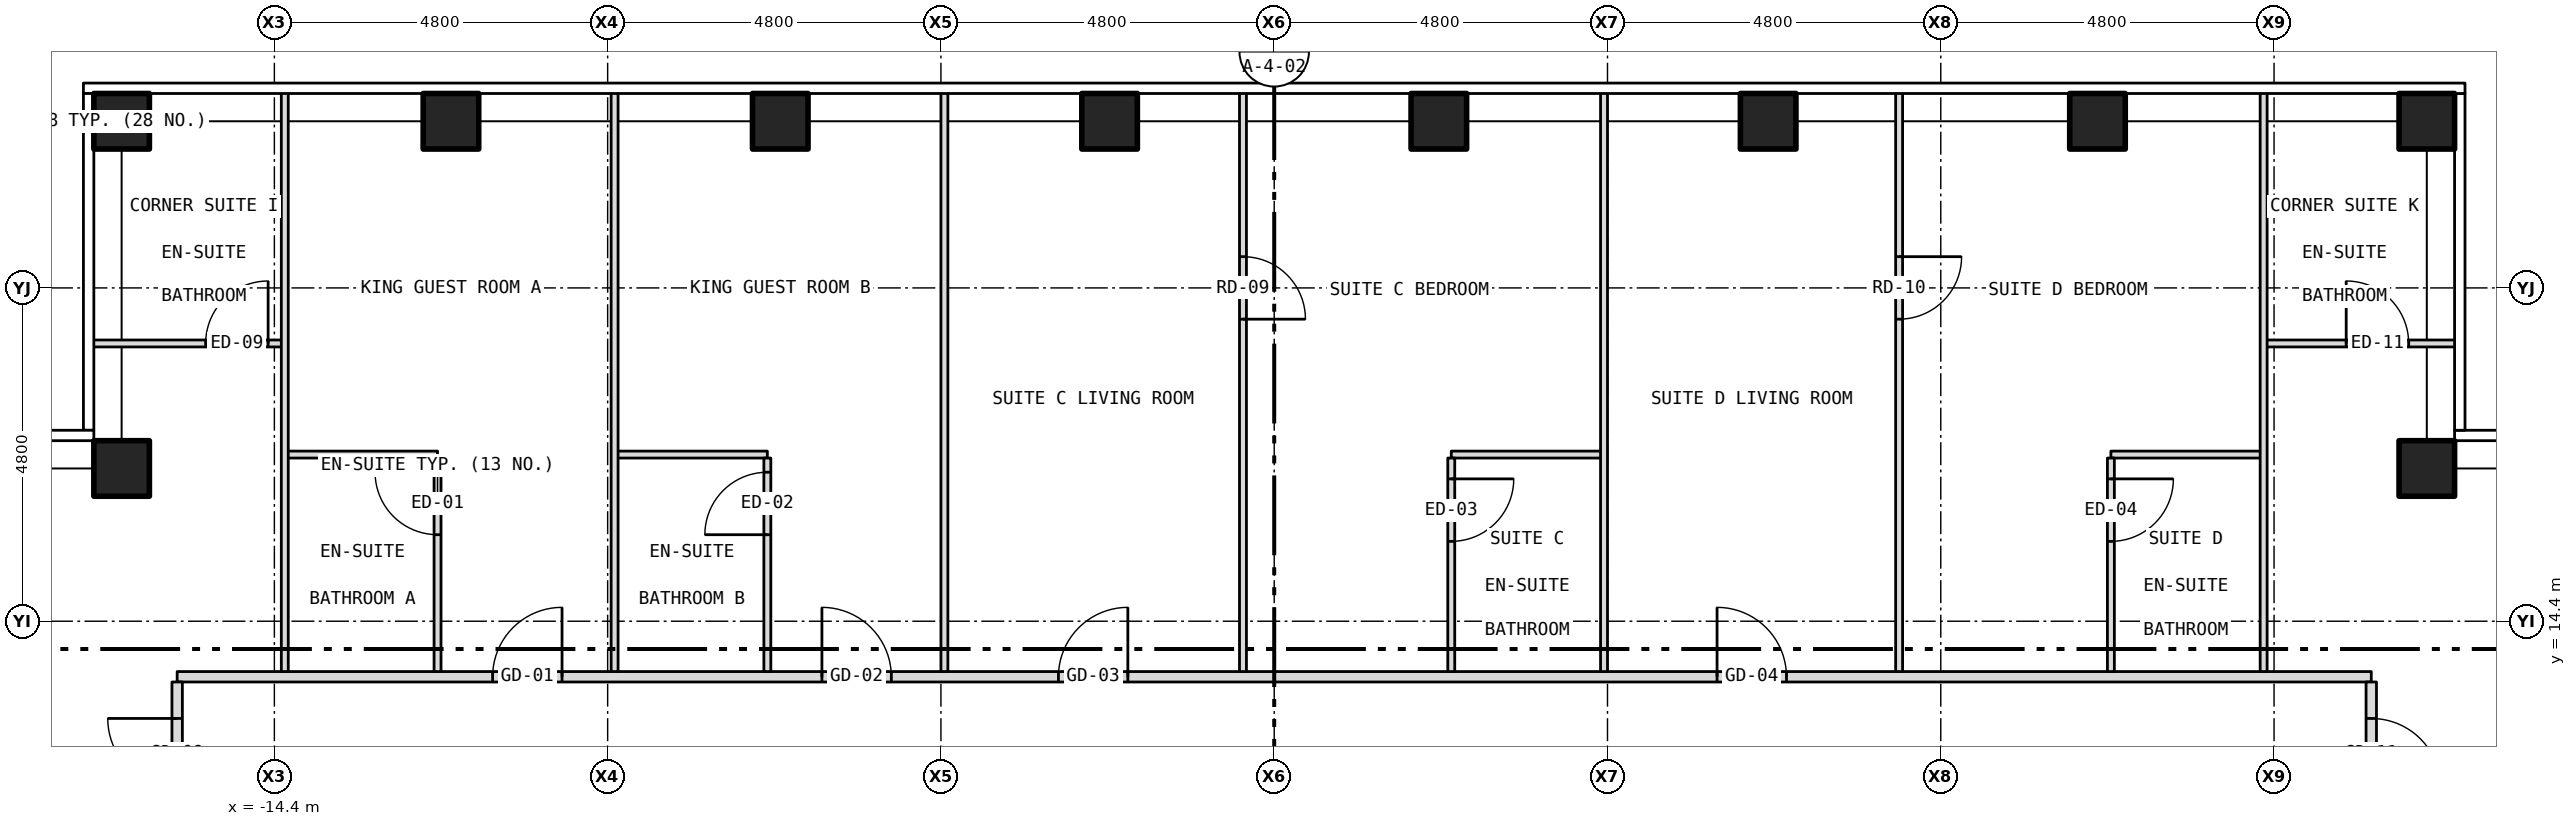
"""IFC4 building model, lengths in metres.
Left out: names, types, materials, properties, quantities, classifications, styles, units other than length and angle.
Written with IfcOpenShell. Run it as: python <this file> out.ifc"""

import sys

from ifc_helpers import new_model, si_unit, direction, frame, frame_2d, origin, origin_2d, place, context, subcontext, project, spatial, rectangle, hollow_rectangle, extrude, element, fill, save


model = new_model("IFC4")
c1 = context("Model", 3, precision=1e-05, world=origin(), true_north=direction((0.0, 1.0)))
c2 = subcontext(c1, "Body", "Model", "MODEL_VIEW")
j1 = project(units=[si_unit("LENGTHUNIT", "METRE"), si_unit("PLANEANGLEUNIT", "RADIAN")], contexts=[c1])
p1 = place(None, origin())
s1 = spatial("IfcSite", under=j1, at=p1, CompositionType="ELEMENT")
p2 = place(p1, origin())
s2 = spatial("IfcBuilding", under=s1, at=p2, CompositionType="ELEMENT")
p3 = place(p2, frame((0.0, 0.0, 165.5)))
s3 = spatial("IfcBuildingStorey", under=s2, at=p3, CompositionType="ELEMENT", Elevation=165.5)
for number, where, z_axis, x_axis in (
    (1, (-16.6, 21.6, -0.15), (0.0, 0.0, 1.0), (1.0, 0.0, 0.0)),
    (2, (-11.857, 21.6, -0.15), (0.0, 0.0, 1.0), (1.0, 0.0, 0.0)),
    (3, (-7.114, 21.6, -0.15), (0.0, 0.0, 1.0), (1.0, 0.0, 0.0)),
    (4, (-2.371, 21.6, -0.15), (0.0, 0.0, 1.0), (1.0, 0.0, 0.0)),
    (5, (2.371, 21.6, -0.15), (0.0, 0.0, 1.0), (1.0, 0.0, 0.0)),
    (6, (7.114, 21.6, -0.15), (0.0, 0.0, 1.0), (1.0, 0.0, 0.0)),
    (7, (11.857, 21.6, -0.15), (0.0, 0.0, 1.0), (1.0, 0.0, 0.0)),
    (8, (16.6, 21.6, -0.15), (0.0, 0.0, 1.0), (1.0, 0.0, 0.0)),
    (9, (-16.6, 16.6, -0.15), (0.0, 0.0, 1.0), (1.0, 0.0, 0.0)),
    (10, (16.6, 16.6, -0.15), (0.0, 0.0, 1.0), (1.0, 0.0, 0.0)),
):
    element("IfcColumn", number, at=place(p3, frame(where, z_axis=z_axis, x_axis=x_axis)), inside=s3, PredefinedType="COLUMN", context=c2, shape_type="SweptSolid", body=[
        extrude(hollow_rectangle(XDim=0.8, YDim=0.8, WallThickness=0.045, at=origin_2d()), origin(), (0.0, 0.0, 1.0), 3.5),
    ])
p4 = place(p3, frame((-15.8, 13.6, 0.0), z_axis=(0.0, 0.0, 1.0), x_axis=(1.0, 0.0, 0.0)))
e11 = element("IfcWall", 11, at=p4, inside=s3, PredefinedType="PARTITIONING", context=c2, shape_type="SweptSolid", body=[
    extrude(rectangle(XDim=31.6, YDim=0.15, at=frame_2d((15.8, 0.0))), origin(), (0.0, 0.0, 1.0), 3.35),
])
p5 = place(p4, frame((4.543, 0.0, 0.0)))
e12 = element("IfcOpeningElement", 12, at=p5, cuts=e11, PredefinedType="OPENING", context=c2, shape_type="SweptSolid", body=[
    extrude(rectangle(XDim=1.0, YDim=2.1, at=frame_2d((0.5, 1.05))), frame((0.0, 0.087, 0.0), z_axis=(0.0, -1.0, 0.0), x_axis=(1.0, 0.0, 0.0)), (0.0, 0.0, 1.0), 0.174),
])
p6 = place(p4, frame((9.286, 0.0, 0.0)))
e13 = element("IfcOpeningElement", 13, at=p6, cuts=e11, PredefinedType="OPENING", context=c2, shape_type="SweptSolid", body=[
    extrude(rectangle(XDim=1.0, YDim=2.1, at=frame_2d((0.5, 1.05))), frame((0.0, 0.087, 0.0), z_axis=(0.0, -1.0, 0.0), x_axis=(1.0, 0.0, 0.0)), (0.0, 0.0, 1.0), 0.174),
])
p7 = place(p4, frame((12.692, 0.0, 0.0)))
e14 = element("IfcOpeningElement", 14, at=p7, cuts=e11, PredefinedType="OPENING", context=c2, shape_type="SweptSolid", body=[
    extrude(rectangle(XDim=1.0, YDim=2.1, at=frame_2d((0.5, 1.05))), frame((0.0, 0.087, 0.0), z_axis=(0.0, -1.0, 0.0), x_axis=(1.0, 0.0, 0.0)), (0.0, 0.0, 1.0), 0.174),
])
p8 = place(p4, frame((22.178, 0.0, 0.0)))
e15 = element("IfcOpeningElement", 15, at=p8, cuts=e11, PredefinedType="OPENING", context=c2, shape_type="SweptSolid", body=[
    extrude(rectangle(XDim=1.0, YDim=2.1, at=frame_2d((0.5, 1.05))), frame((0.0, 0.087, 0.0), z_axis=(0.0, -1.0, 0.0), x_axis=(1.0, 0.0, 0.0)), (0.0, 0.0, 1.0), 0.174),
])
for number, where, z_axis, x_axis in (
    (16, (-14.25, 16.8, 0.0), (0.0, 0.0, 1.0), (1.0, 0.0, 0.0)),
    (17, (-9.5, 16.8, 0.0), (0.0, 0.0, 1.0), (1.0, 0.0, 0.0)),
    (18, (2.55, 16.8, 0.0), (0.0, 0.0, 1.0), (1.0, 0.0, 0.0)),
    (19, (12.05, 16.8, 0.0), (0.0, 0.0, 1.0), (1.0, 0.0, 0.0)),
):
    element("IfcWall", number, at=place(p3, frame(where, z_axis=z_axis, x_axis=x_axis)), inside=s3, PredefinedType="PARTITIONING", context=c2, shape_type="SweptSolid", body=[
        extrude(rectangle(XDim=2.2, YDim=0.1, at=frame_2d((1.1, 0.0))), origin(), (0.0, 0.0, 1.0), 3.35),
    ])
p9 = place(p3, frame((-17.03, 18.4, 0.0), z_axis=(0.0, 0.0, 1.0), x_axis=(1.0, 0.0, 0.0)))
e20 = element("IfcWall", 20, at=p9, inside=s3, PredefinedType="PARTITIONING", context=c2, shape_type="SweptSolid", body=[
    extrude(rectangle(XDim=2.78, YDim=0.1, at=frame_2d((1.39, 0.0))), origin(), (0.0, 0.0, 1.0), 3.35),
])
p10 = place(p9, frame((1.64, 0.0, 0.0)))
e21 = element("IfcOpeningElement", 21, at=p10, cuts=e20, PredefinedType="OPENING", context=c2, shape_type="SweptSolid", body=[
    extrude(rectangle(XDim=0.9, YDim=2.1, at=frame_2d((0.45, 1.05))), frame((0.0, 0.062, 0.0), z_axis=(0.0, -1.0, 0.0), x_axis=(1.0, 0.0, 0.0)), (0.0, 0.0, 1.0), 0.124),
])
p11 = place(p3, frame((14.25, 18.4, 0.0), z_axis=(0.0, 0.0, 1.0), x_axis=(1.0, 0.0, 0.0)))
e22 = element("IfcWall", 22, at=p11, inside=s3, PredefinedType="PARTITIONING", context=c2, shape_type="SweptSolid", body=[
    extrude(rectangle(XDim=2.78, YDim=0.1, at=frame_2d((1.39, 0.0))), origin(), (0.0, 0.0, 1.0), 3.35),
])
p12 = place(p11, frame((1.189, 0.0, 0.0)))
e23 = element("IfcOpeningElement", 23, at=p12, cuts=e22, PredefinedType="OPENING", context=c2, shape_type="SweptSolid", body=[
    extrude(rectangle(XDim=0.9, YDim=2.1, at=frame_2d((0.45, 1.05))), frame((0.0, 0.062, 0.0), z_axis=(0.0, -1.0, 0.0), x_axis=(1.0, 0.0, 0.0)), (0.0, 0.0, 1.0), 0.124),
])
p13 = place(p3, frame((-15.8, 10.92, 0.0), z_axis=(0.0, 0.0, 1.0), x_axis=(0.0, 1.0, 0.0)))
e24 = element("IfcWall", 24, at=p13, inside=s3, PredefinedType="PARTITIONING", context=c2, shape_type="SweptSolid", body=[
    extrude(rectangle(XDim=2.605, YDim=0.15, at=frame_2d((1.302, 0.0))), origin(), (0.0, 0.0, 1.0), 3.35),
])
p14 = place(p13, frame((1.08, 0.0, 0.0)))
e25 = element("IfcOpeningElement", 25, at=p14, cuts=e24, PredefinedType="OPENING", context=c2, shape_type="SweptSolid", body=[
    extrude(rectangle(XDim=1.0, YDim=2.1, at=frame_2d((0.5, 1.05))), frame((0.0, 0.087, 0.0), z_axis=(0.0, -1.0, 0.0), x_axis=(1.0, 0.0, 0.0)), (0.0, 0.0, 1.0), 0.174),
])
p15 = place(p3, frame((-14.25, 13.675, 0.0), z_axis=(0.0, 0.0, 1.0), x_axis=(0.0, 1.0, 0.0)))
e26 = element("IfcWall", 26, at=p15, inside=s3, PredefinedType="PARTITIONING", context=c2, shape_type="SweptSolid", body=[
    extrude(rectangle(XDim=8.355, YDim=0.1, at=frame_2d((4.177, 0.0))), origin(), (0.0, 0.0, 1.0), 2.817),
])
p16 = place(p3, frame((-12.05, 13.675, 0.0), z_axis=(0.0, 0.0, 1.0), x_axis=(0.0, 1.0, 0.0)))
e27 = element("IfcWall", 27, at=p16, inside=s3, PredefinedType="PARTITIONING", context=c2, shape_type="SweptSolid", body=[
    extrude(rectangle(XDim=3.075, YDim=0.1, at=frame_2d((1.538, 0.0))), origin(), (0.0, 0.0, 1.0), 3.35),
])
p17 = place(p16, frame((1.971, 0.0, 0.0)))
e28 = element("IfcOpeningElement", 28, at=p17, cuts=e27, PredefinedType="OPENING", context=c2, shape_type="SweptSolid", body=[
    extrude(rectangle(XDim=0.9, YDim=2.1, at=frame_2d((0.45, 1.05))), frame((0.0, 0.062, 0.0), z_axis=(0.0, -1.0, 0.0), x_axis=(1.0, 0.0, 0.0)), (0.0, 0.0, 1.0), 0.124),
])
p18 = place(p3, frame((-9.5, 13.675, 0.0), z_axis=(0.0, 0.0, 1.0), x_axis=(0.0, 1.0, 0.0)))
e29 = element("IfcWall", 29, at=p18, inside=s3, PredefinedType="PARTITIONING", context=c2, shape_type="SweptSolid", body=[
    extrude(rectangle(XDim=8.355, YDim=0.1, at=frame_2d((4.177, 0.0))), origin(), (0.0, 0.0, 1.0), 2.728),
])
p19 = place(p3, frame((-7.3, 13.675, 0.0), z_axis=(0.0, 0.0, 1.0), x_axis=(0.0, 1.0, 0.0)))
e30 = element("IfcWall", 30, at=p19, inside=s3, PredefinedType="PARTITIONING", context=c2, shape_type="SweptSolid", body=[
    extrude(rectangle(XDim=3.075, YDim=0.1, at=frame_2d((1.538, 0.0))), origin(), (0.0, 0.0, 1.0), 3.35),
])
p20 = place(p19, frame((1.971, 0.0, 0.0)))
e31 = element("IfcOpeningElement", 31, at=p20, cuts=e30, PredefinedType="OPENING", context=c2, shape_type="SweptSolid", body=[
    extrude(rectangle(XDim=0.9, YDim=2.1, at=frame_2d((0.45, 1.05))), frame((0.0, 0.062, 0.0), z_axis=(0.0, -1.0, 0.0), x_axis=(1.0, 0.0, 0.0)), (0.0, 0.0, 1.0), 0.124),
])
p21 = place(p3, frame((-4.75, 13.675, 0.0), z_axis=(0.0, 0.0, 1.0), x_axis=(0.0, 1.0, 0.0)))
e32 = element("IfcWall", 32, at=p21, inside=s3, PredefinedType="PARTITIONING", context=c2, shape_type="SweptSolid", body=[
    extrude(rectangle(XDim=8.355, YDim=0.1, at=frame_2d((4.177, 0.0))), origin(), (0.0, 0.0, 1.0), 2.817),
])
p22 = place(p3, frame((-0.45, 13.675, 0.0), z_axis=(0.0, 0.0, 1.0), x_axis=(0.0, 1.0, 0.0)))
e33 = element("IfcWall", 33, at=p22, inside=s3, PredefinedType="PARTITIONING", context=c2, shape_type="SweptSolid", body=[
    extrude(rectangle(XDim=8.355, YDim=0.1, at=frame_2d((4.177, 0.0))), origin(), (0.0, 0.0, 1.0), 3.35),
])
p23 = place(p22, frame((5.075, 0.0, 0.0)))
e34 = element("IfcOpeningElement", 34, at=p23, cuts=e33, PredefinedType="OPENING", context=c2, shape_type="SweptSolid", body=[
    extrude(rectangle(XDim=0.9, YDim=2.1, at=frame_2d((0.45, 1.05))), frame((0.0, 0.062, 0.0), z_axis=(0.0, -1.0, 0.0), x_axis=(1.0, 0.0, 0.0)), (0.0, 0.0, 1.0), 0.124),
])
p24 = place(p3, frame((2.55, 13.675, 0.0), z_axis=(0.0, 0.0, 1.0), x_axis=(0.0, 1.0, 0.0)))
e35 = element("IfcWall", 35, at=p24, inside=s3, PredefinedType="PARTITIONING", context=c2, shape_type="SweptSolid", body=[
    extrude(rectangle(XDim=3.075, YDim=0.1, at=frame_2d((1.538, 0.0))), origin(), (0.0, 0.0, 1.0), 3.35),
])
p25 = place(p24, frame((1.875, 0.0, 0.0)))
e36 = element("IfcOpeningElement", 36, at=p25, cuts=e35, PredefinedType="OPENING", context=c2, shape_type="SweptSolid", body=[
    extrude(rectangle(XDim=0.9, YDim=2.1, at=frame_2d((0.45, 1.05))), frame((0.0, 0.062, 0.0), z_axis=(0.0, -1.0, 0.0), x_axis=(1.0, 0.0, 0.0)), (0.0, 0.0, 1.0), 0.124),
])
p26 = place(p3, frame((4.75, 13.675, 0.0), z_axis=(0.0, 0.0, 1.0), x_axis=(0.0, 1.0, 0.0)))
e37 = element("IfcWall", 37, at=p26, inside=s3, PredefinedType="PARTITIONING", context=c2, shape_type="SweptSolid", body=[
    extrude(rectangle(XDim=8.355, YDim=0.1, at=frame_2d((4.177, 0.0))), origin(), (0.0, 0.0, 1.0), 2.817),
])
p27 = place(p3, frame((9.0, 13.675, 0.0), z_axis=(0.0, 0.0, 1.0), x_axis=(0.0, 1.0, 0.0)))
e38 = element("IfcWall", 38, at=p27, inside=s3, PredefinedType="PARTITIONING", context=c2, shape_type="SweptSolid", body=[
    extrude(rectangle(XDim=8.355, YDim=0.1, at=frame_2d((4.177, 0.0))), origin(), (0.0, 0.0, 1.0), 3.35),
])
p28 = place(p27, frame((5.075, 0.0, 0.0)))
e39 = element("IfcOpeningElement", 39, at=p28, cuts=e38, PredefinedType="OPENING", context=c2, shape_type="SweptSolid", body=[
    extrude(rectangle(XDim=0.9, YDim=2.1, at=frame_2d((0.45, 1.05))), frame((0.0, 0.062, 0.0), z_axis=(0.0, -1.0, 0.0), x_axis=(1.0, 0.0, 0.0)), (0.0, 0.0, 1.0), 0.124),
])
p29 = place(p3, frame((12.05, 13.675, 0.0), z_axis=(0.0, 0.0, 1.0), x_axis=(0.0, 1.0, 0.0)))
e40 = element("IfcWall", 40, at=p29, inside=s3, PredefinedType="PARTITIONING", context=c2, shape_type="SweptSolid", body=[
    extrude(rectangle(XDim=3.075, YDim=0.1, at=frame_2d((1.538, 0.0))), origin(), (0.0, 0.0, 1.0), 3.35),
])
p30 = place(p29, frame((1.875, 0.0, 0.0)))
e41 = element("IfcOpeningElement", 41, at=p30, cuts=e40, PredefinedType="OPENING", context=c2, shape_type="SweptSolid", body=[
    extrude(rectangle(XDim=0.9, YDim=2.1, at=frame_2d((0.45, 1.05))), frame((0.0, 0.062, 0.0), z_axis=(0.0, -1.0, 0.0), x_axis=(1.0, 0.0, 0.0)), (0.0, 0.0, 1.0), 0.124),
])
p31 = place(p3, frame((14.25, 13.675, 0.0), z_axis=(0.0, 0.0, 1.0), x_axis=(0.0, 1.0, 0.0)))
e42 = element("IfcWall", 42, at=p31, inside=s3, PredefinedType="PARTITIONING", context=c2, shape_type="SweptSolid", body=[
    extrude(rectangle(XDim=8.355, YDim=0.1, at=frame_2d((4.177, 0.0))), origin(), (0.0, 0.0, 1.0), 2.817),
])
p32 = place(p3, frame((15.8, 10.92, 0.0), z_axis=(0.0, 0.0, 1.0), x_axis=(0.0, 1.0, 0.0)))
e43 = element("IfcWall", 43, at=p32, inside=s3, PredefinedType="PARTITIONING", context=c2, shape_type="SweptSolid", body=[
    extrude(rectangle(XDim=2.605, YDim=0.15, at=frame_2d((1.302, 0.0))), origin(), (0.0, 0.0, 1.0), 3.35),
])
p33 = place(p32, frame((1.08, 0.0, 0.0)))
e44 = element("IfcOpeningElement", 44, at=p33, cuts=e43, PredefinedType="OPENING", context=c2, shape_type="SweptSolid", body=[
    extrude(rectangle(XDim=1.0, YDim=2.1, at=frame_2d((0.5, 1.05))), frame((0.0, 0.087, 0.0), z_axis=(0.0, -1.0, 0.0), x_axis=(1.0, 0.0, 0.0)), (0.0, 0.0, 1.0), 0.174),
])
p34 = place(p5, origin())
e45 = element("IfcDoor", 45, at=p34, inside=s3, OperationType="SINGLE_SWING_RIGHT", PredefinedType="DOOR", context=c2, shape_type="SweptSolid", body=[
    extrude(rectangle(XDim=1.0, YDim=2.1, at=frame_2d((0.5, 1.05))), frame((0.0, 0.025, 0.0), z_axis=(0.0, -1.0, 0.0), x_axis=(1.0, 0.0, 0.0)), (0.0, 0.0, 1.0), 0.05),
])
fill(e12, e45)
p35 = place(p17, origin())
e46 = element("IfcDoor", 46, at=p35, inside=s3, OperationType="SINGLE_SWING_RIGHT", PredefinedType="DOOR", context=c2, shape_type="SweptSolid", body=[
    extrude(rectangle(XDim=0.9, YDim=2.1, at=frame_2d((0.45, 1.05))), frame((0.0, 0.025, 0.0), z_axis=(0.0, -1.0, 0.0), x_axis=(1.0, 0.0, 0.0)), (0.0, 0.0, 1.0), 0.05),
])
fill(e28, e46)
p36 = place(p6, origin())
e47 = element("IfcDoor", 47, at=p36, inside=s3, OperationType="SINGLE_SWING_LEFT", PredefinedType="DOOR", context=c2, shape_type="SweptSolid", body=[
    extrude(rectangle(XDim=1.0, YDim=2.1, at=frame_2d((0.5, 1.05))), frame((0.0, 0.025, 0.0), z_axis=(0.0, -1.0, 0.0), x_axis=(1.0, 0.0, 0.0)), (0.0, 0.0, 1.0), 0.05),
])
fill(e13, e47)
p37 = place(p20, origin())
e48 = element("IfcDoor", 48, at=p37, inside=s3, OperationType="SINGLE_SWING_LEFT", PredefinedType="DOOR", context=c2, shape_type="SweptSolid", body=[
    extrude(rectangle(XDim=0.9, YDim=2.1, at=frame_2d((0.45, 1.05))), frame((0.0, 0.025, 0.0), z_axis=(0.0, -1.0, 0.0), x_axis=(1.0, 0.0, 0.0)), (0.0, 0.0, 1.0), 0.05),
])
fill(e31, e48)
p38 = place(p7, origin())
e49 = element("IfcDoor", 49, at=p38, inside=s3, OperationType="SINGLE_SWING_RIGHT", PredefinedType="DOOR", context=c2, shape_type="SweptSolid", body=[
    extrude(rectangle(XDim=1.0, YDim=2.1, at=frame_2d((0.5, 1.05))), frame((0.0, 0.025, 0.0), z_axis=(0.0, -1.0, 0.0), x_axis=(1.0, 0.0, 0.0)), (0.0, 0.0, 1.0), 0.05),
])
fill(e14, e49)
p39 = place(p23, origin())
e50 = element("IfcDoor", 50, at=p39, inside=s3, OperationType="SINGLE_SWING_LEFT", PredefinedType="DOOR", context=c2, shape_type="SweptSolid", body=[
    extrude(rectangle(XDim=0.9, YDim=2.1, at=frame_2d((0.45, 1.05))), frame((0.0, 0.025, 0.0), z_axis=(0.0, -1.0, 0.0), x_axis=(1.0, 0.0, 0.0)), (0.0, 0.0, 1.0), 0.05),
])
fill(e34, e50)
p40 = place(p25, origin())
e51 = element("IfcDoor", 51, at=p40, inside=s3, OperationType="SINGLE_SWING_RIGHT", PredefinedType="DOOR", context=c2, shape_type="SweptSolid", body=[
    extrude(rectangle(XDim=0.9, YDim=2.1, at=frame_2d((0.45, 1.05))), frame((0.0, 0.025, 0.0), z_axis=(0.0, -1.0, 0.0), x_axis=(1.0, 0.0, 0.0)), (0.0, 0.0, 1.0), 0.05),
])
fill(e36, e51)
p41 = place(p8, origin())
e52 = element("IfcDoor", 52, at=p41, inside=s3, OperationType="SINGLE_SWING_LEFT", PredefinedType="DOOR", context=c2, shape_type="SweptSolid", body=[
    extrude(rectangle(XDim=1.0, YDim=2.1, at=frame_2d((0.5, 1.05))), frame((0.0, 0.025, 0.0), z_axis=(0.0, -1.0, 0.0), x_axis=(1.0, 0.0, 0.0)), (0.0, 0.0, 1.0), 0.05),
])
fill(e15, e52)
p42 = place(p28, origin())
e53 = element("IfcDoor", 53, at=p42, inside=s3, OperationType="SINGLE_SWING_RIGHT", PredefinedType="DOOR", context=c2, shape_type="SweptSolid", body=[
    extrude(rectangle(XDim=0.9, YDim=2.1, at=frame_2d((0.45, 1.05))), frame((0.0, 0.025, 0.0), z_axis=(0.0, -1.0, 0.0), x_axis=(1.0, 0.0, 0.0)), (0.0, 0.0, 1.0), 0.05),
])
fill(e39, e53)
p43 = place(p30, origin())
e54 = element("IfcDoor", 54, at=p43, inside=s3, OperationType="SINGLE_SWING_RIGHT", PredefinedType="DOOR", context=c2, shape_type="SweptSolid", body=[
    extrude(rectangle(XDim=0.9, YDim=2.1, at=frame_2d((0.45, 1.05))), frame((0.0, 0.025, 0.0), z_axis=(0.0, -1.0, 0.0), x_axis=(1.0, 0.0, 0.0)), (0.0, 0.0, 1.0), 0.05),
])
fill(e41, e54)
p44 = place(p10, origin())
e55 = element("IfcDoor", 55, at=p44, inside=s3, OperationType="SINGLE_SWING_RIGHT", PredefinedType="DOOR", context=c2, shape_type="SweptSolid", body=[
    extrude(rectangle(XDim=0.9, YDim=2.1, at=frame_2d((0.45, 1.05))), frame((0.0, 0.025, 0.0), z_axis=(0.0, -1.0, 0.0), x_axis=(1.0, 0.0, 0.0)), (0.0, 0.0, 1.0), 0.05),
])
fill(e21, e55)
p45 = place(p14, origin())
e56 = element("IfcDoor", 56, at=p45, inside=s3, OperationType="SINGLE_SWING_RIGHT", PredefinedType="DOOR", context=c2, shape_type="SweptSolid", body=[
    extrude(rectangle(XDim=1.0, YDim=2.1, at=frame_2d((0.5, 1.05))), frame((0.0, 0.025, 0.0), z_axis=(0.0, -1.0, 0.0), x_axis=(1.0, 0.0, 0.0)), (0.0, 0.0, 1.0), 0.05),
])
fill(e25, e56)
p46 = place(p12, origin())
e57 = element("IfcDoor", 57, at=p46, inside=s3, OperationType="SINGLE_SWING_LEFT", PredefinedType="DOOR", context=c2, shape_type="SweptSolid", body=[
    extrude(rectangle(XDim=0.9, YDim=2.1, at=frame_2d((0.45, 1.05))), frame((0.0, 0.025, 0.0), z_axis=(0.0, -1.0, 0.0), x_axis=(1.0, 0.0, 0.0)), (0.0, 0.0, 1.0), 0.05),
])
fill(e23, e57)
p47 = place(p33, origin())
e58 = element("IfcDoor", 58, at=p47, inside=s3, OperationType="SINGLE_SWING_LEFT", PredefinedType="DOOR", context=c2, shape_type="SweptSolid", body=[
    extrude(rectangle(XDim=1.0, YDim=2.1, at=frame_2d((0.5, 1.05))), frame((0.0, 0.025, 0.0), z_axis=(0.0, -1.0, 0.0), x_axis=(1.0, 0.0, 0.0)), (0.0, 0.0, 1.0), 0.05),
])
fill(e44, e58)
save(model, sys.argv[1])
